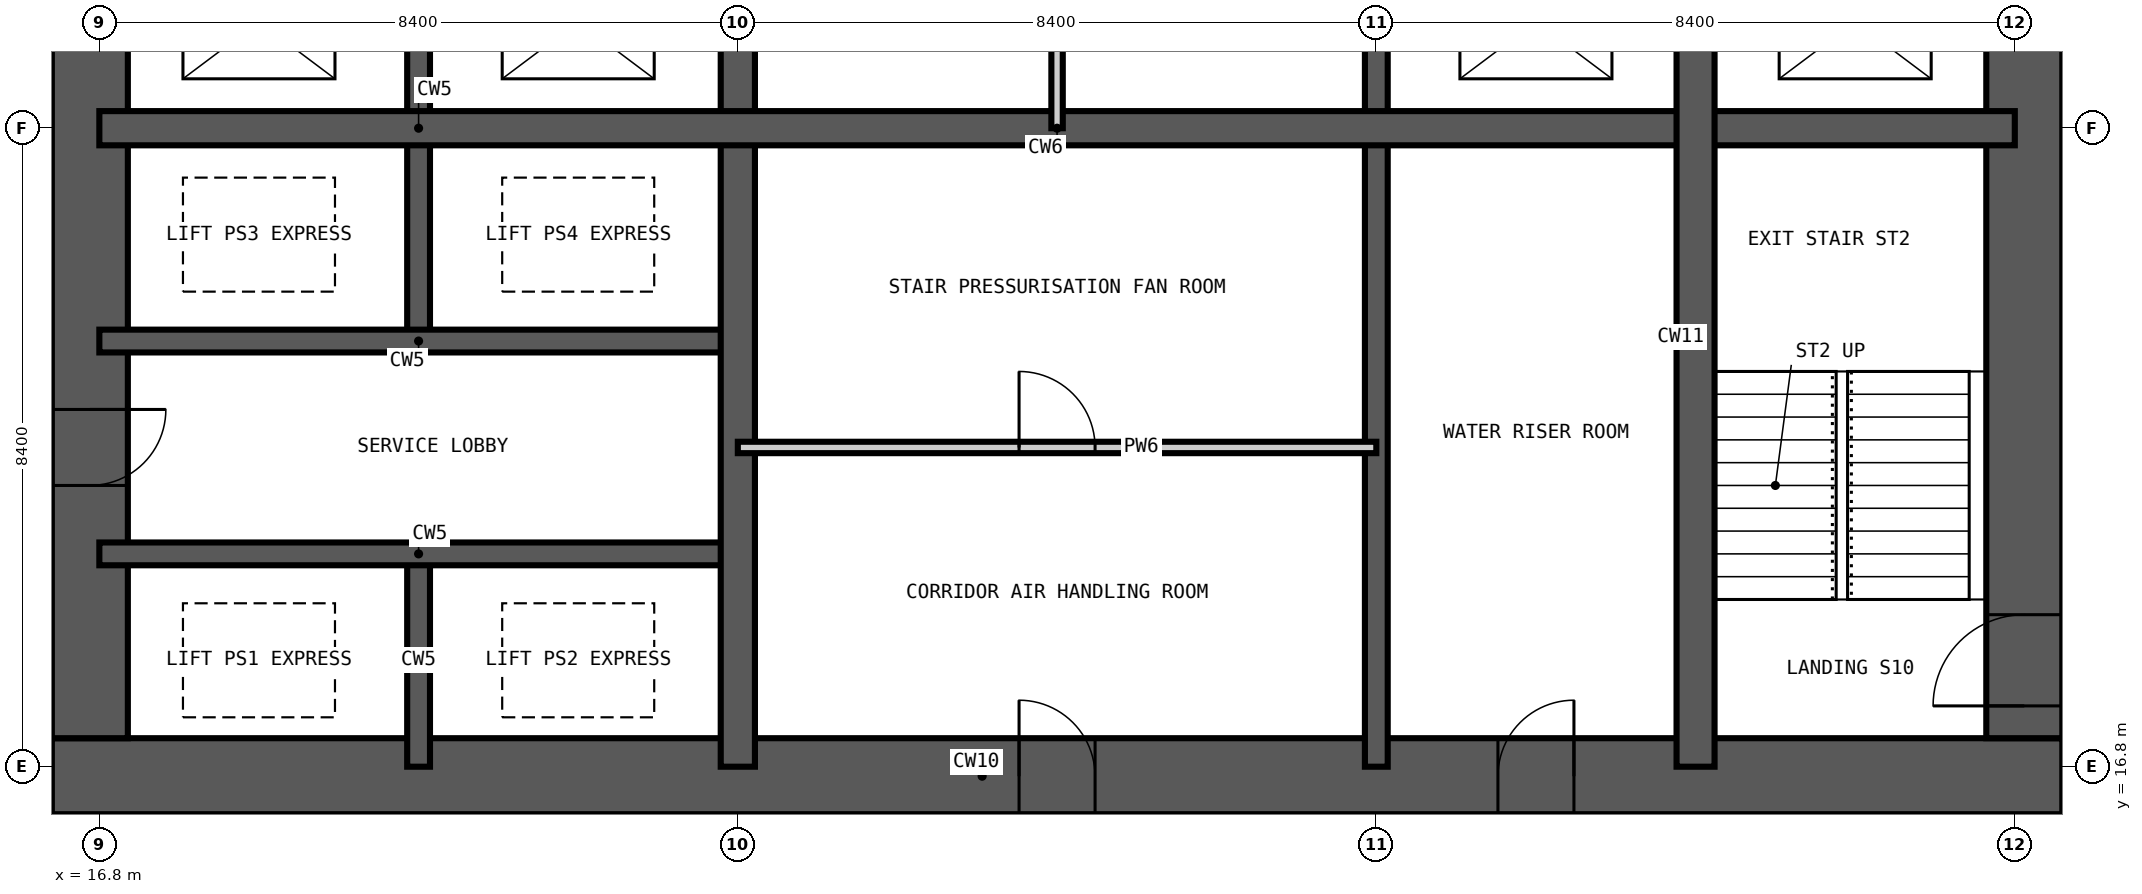
"""IFC4 building model, lengths in metres.
Left out: names, types, materials, properties, quantities, classifications, styles, units other than length and angle.
Written with IfcOpenShell. Run it as: python <this file> out.ifc"""

import sys

from ifc_helpers import new_model, si_unit, direction, frame, frame_2d, origin, place, context, subcontext, project, spatial, rectangle, extrude, element, fill, save


model = new_model("IFC4")
c1 = context("Model", 3, precision=1e-05, world=origin(), true_north=direction((0.0, 1.0)))
c2 = subcontext(c1, "Body", "Model", "MODEL_VIEW")
j1 = project(units=[si_unit("LENGTHUNIT", "METRE"), si_unit("PLANEANGLEUNIT", "RADIAN")], contexts=[c1])
p1 = place(None, origin())
s1 = spatial("IfcSite", under=j1, at=p1, CompositionType="ELEMENT")
p2 = place(p1, origin())
s2 = spatial("IfcBuilding", under=s1, at=p2, CompositionType="ELEMENT")
p3 = place(p2, frame((0.0, 0.0, 122.4)))
s3 = spatial("IfcBuildingStorey", under=s2, at=p3, CompositionType="ELEMENT", Elevation=122.4)
p4 = place(p3, frame((16.175, 16.675, -0.35), z_axis=(0.0, 0.0, 1.0), x_axis=(1.0, 0.0, 0.0)))
e1 = element("IfcWall", 1, at=p4, inside=s3, PredefinedType="SHEAR", context=c2, shape_type="SweptSolid", body=[
    extrude(rectangle(XDim=26.45, YDim=1.0, at=frame_2d((13.225, 0.0))), origin(), (0.0, 0.0, 1.0), 3.6),
])
p5 = place(p4, frame((12.725, 0.0, 0.35)))
e2 = element("IfcOpeningElement", 2, at=p5, cuts=e1, PredefinedType="OPENING", context=c2, shape_type="SweptSolid", body=[
    extrude(rectangle(XDim=1.0, YDim=2.1, at=frame_2d((0.5, 1.05))), frame((0.0, 0.51, 0.0), z_axis=(0.0, -1.0, 0.0), x_axis=(1.0, 0.0, 0.0)), (0.0, 0.0, 1.0), 1.02),
])
p6 = place(p4, frame((19.025, 0.0, 0.35)))
e3 = element("IfcOpeningElement", 3, at=p6, cuts=e1, PredefinedType="OPENING", context=c2, shape_type="SweptSolid", body=[
    extrude(rectangle(XDim=1.0, YDim=2.1, at=frame_2d((0.5, 1.05))), frame((0.0, 0.51, 0.0), z_axis=(0.0, -1.0, 0.0), x_axis=(1.0, 0.0, 0.0)), (0.0, 0.0, 1.0), 1.02),
])
p7 = place(p3, frame((42.125, 17.175, -0.35), z_axis=(0.0, 0.0, 1.0), x_axis=(0.0, 1.0, 0.0)))
e4 = element("IfcWall", 4, at=p7, inside=s3, PredefinedType="SHEAR", context=c2, shape_type="SweptSolid", body=[
    extrude(rectangle(XDim=24.45, YDim=1.0, at=frame_2d((12.225, 0.0))), origin(), (0.0, 0.0, 1.0), 3.6),
])
p8 = place(p7, frame((0.425, 0.0, 0.35)))
e5 = element("IfcOpeningElement", 5, at=p8, cuts=e4, PredefinedType="OPENING", context=c2, shape_type="SweptSolid", body=[
    extrude(rectangle(XDim=1.2, YDim=2.2, at=frame_2d((0.6, 1.1))), frame((0.0, 0.51, 0.0), z_axis=(0.0, -1.0, 0.0), x_axis=(1.0, 0.0, 0.0)), (0.0, 0.0, 1.0), 1.02),
])
p9 = place(p7, frame((11.325, 0.0, 0.35)))
e6 = element("IfcOpeningElement", 6, at=p9, cuts=e4, PredefinedType="OPENING", context=c2, shape_type="SweptSolid", body=[
    extrude(rectangle(XDim=1.8, YDim=2.2, at=frame_2d((0.9, 1.1))), frame((0.0, 0.51, 0.0), z_axis=(0.0, -1.0, 0.0), x_axis=(1.0, 0.0, 0.0)), (0.0, 0.0, 1.0), 1.02),
])
p10 = place(p7, frame((20.125, 0.0, 0.35)))
e7 = element("IfcOpeningElement", 7, at=p10, cuts=e4, PredefinedType="OPENING", context=c2, shape_type="SweptSolid", body=[
    extrude(rectangle(XDim=1.0, YDim=2.1, at=frame_2d((0.5, 1.05))), frame((0.0, 0.51, 0.0), z_axis=(0.0, -1.0, 0.0), x_axis=(1.0, 0.0, 0.0)), (0.0, 0.0, 1.0), 1.02),
])
p11 = place(p3, frame((16.675, 41.625, -0.35), z_axis=(0.0, 0.0, 1.0), x_axis=(0.0, -1.0, 0.0)))
e8 = element("IfcWall", 8, at=p11, inside=s3, PredefinedType="SHEAR", context=c2, shape_type="SweptSolid", body=[
    extrude(rectangle(XDim=24.45, YDim=1.0, at=frame_2d((12.225, 0.0))), origin(), (0.0, 0.0, 1.0), 3.6),
])
p12 = place(p11, frame((11.325, 0.0, 0.35)))
e9 = element("IfcOpeningElement", 9, at=p12, cuts=e8, PredefinedType="OPENING", context=c2, shape_type="SweptSolid", body=[
    extrude(rectangle(XDim=1.8, YDim=2.2, at=frame_2d((0.9, 1.1))), frame((0.0, 0.51, 0.0), z_axis=(0.0, -1.0, 0.0), x_axis=(1.0, 0.0, 0.0)), (0.0, 0.0, 1.0), 1.02),
])
p13 = place(p11, frame((20.125, 0.0, 0.35)))
e10 = element("IfcOpeningElement", 10, at=p13, cuts=e8, PredefinedType="OPENING", context=c2, shape_type="SweptSolid", body=[
    extrude(rectangle(XDim=1.0, YDim=2.1, at=frame_2d((0.5, 1.05))), frame((0.0, 0.51, 0.0), z_axis=(0.0, -1.0, 0.0), x_axis=(1.0, 0.0, 0.0)), (0.0, 0.0, 1.0), 1.02),
])
p14 = place(p11, frame((5.425, 0.0, 0.35)))
e11 = element("IfcOpeningElement", 11, at=p14, cuts=e8, PredefinedType="OPENING", context=c2, shape_type="SweptSolid", body=[
    extrude(rectangle(XDim=1.0, YDim=2.1, at=frame_2d((0.5, 1.05))), frame((0.0, 0.51, 0.0), z_axis=(0.0, -1.0, 0.0), x_axis=(1.0, 0.0, 0.0)), (0.0, 0.0, 1.0), 1.02),
])
p15 = place(p3, frame((21.0, 16.8, -0.35), z_axis=(0.0, 0.0, 1.0), x_axis=(0.0, 1.0, 0.0)))
e12 = element("IfcWall", 12, at=p15, inside=s3, PredefinedType="SHEAR", context=c2, shape_type="SweptSolid", body=[
    extrude(rectangle(XDim=2.8, YDim=0.3, at=frame_2d((1.4, 0.0))), origin(), (0.0, 0.0, 1.0), 3.6),
])
p16 = place(p3, frame((21.0, 22.4, -0.35), z_axis=(0.0, 0.0, 1.0), x_axis=(0.0, 1.0, 0.0)))
e13 = element("IfcWall", 13, at=p16, inside=s3, PredefinedType="SHEAR", context=c2, shape_type="SweptSolid", body=[
    extrude(rectangle(XDim=5.6, YDim=0.3, at=frame_2d((2.8, 0.0))), origin(), (0.0, 0.0, 1.0), 3.6),
])
p17 = place(p3, frame((33.6, 16.8, -0.35), z_axis=(0.0, 0.0, 1.0), x_axis=(0.0, 1.0, 0.0)))
e14 = element("IfcWall", 14, at=p17, inside=s3, PredefinedType="SHEAR", context=c2, shape_type="SweptSolid", body=[
    extrude(rectangle(XDim=25.2, YDim=0.3, at=frame_2d((12.6, 0.0))), origin(), (0.0, 0.0, 1.0), 3.6),
])
p18 = place(p17, frame((22.5, 0.0, 0.35)))
e15 = element("IfcOpeningElement", 15, at=p18, cuts=e14, PredefinedType="OPENING", context=c2, shape_type="SweptSolid", body=[
    extrude(rectangle(XDim=1.2, YDim=2.2, at=frame_2d((0.6, 1.1))), frame((0.0, 0.16, 0.0), z_axis=(0.0, -1.0, 0.0), x_axis=(1.0, 0.0, 0.0)), (0.0, 0.0, 1.0), 0.32),
])
p19 = place(p17, frame((18.3, 0.0, 0.35)))
e16 = element("IfcOpeningElement", 16, at=p19, cuts=e14, PredefinedType="OPENING", context=c2, shape_type="SweptSolid", body=[
    extrude(rectangle(XDim=1.2, YDim=2.2, at=frame_2d((0.6, 1.1))), frame((0.0, 0.16, 0.0), z_axis=(0.0, -1.0, 0.0), x_axis=(1.0, 0.0, 0.0)), (0.0, 0.0, 1.0), 0.32),
])
for number, where, z_axis, x_axis in (
    (17, (16.8, 19.6, -0.35), (0.0, 0.0, 1.0), (1.0, 0.0, 0.0)),
    (18, (16.8, 22.4, -0.35), (0.0, 0.0, 1.0), (1.0, 0.0, 0.0)),
):
    element("IfcWall", number, at=place(p3, frame(where, z_axis=z_axis, x_axis=x_axis)), inside=s3, PredefinedType="SHEAR", context=c2, shape_type="SweptSolid", body=[
        extrude(rectangle(XDim=8.4, YDim=0.3, at=frame_2d((4.2, 0.0))), origin(), (0.0, 0.0, 1.0), 3.6),
    ])
p20 = place(p3, frame((25.2, 16.8, -0.35), z_axis=(0.0, 0.0, 1.0), x_axis=(0.0, 1.0, 0.0)))
e19 = element("IfcWall", 19, at=p20, inside=s3, PredefinedType="SHEAR", context=c2, shape_type="SweptSolid", body=[
    extrude(rectangle(XDim=25.2, YDim=0.45, at=frame_2d((12.6, 0.0))), origin(), (0.0, 0.0, 1.0), 3.6),
])
p21 = place(p20, frame((12.1, 0.0, 0.35)))
e20 = element("IfcOpeningElement", 20, at=p21, cuts=e19, PredefinedType="OPENING", context=c2, shape_type="SweptSolid", body=[
    extrude(rectangle(XDim=1.0, YDim=2.1, at=frame_2d((0.5, 1.05))), frame((0.0, 0.235, 0.0), z_axis=(0.0, -1.0, 0.0), x_axis=(1.0, 0.0, 0.0)), (0.0, 0.0, 1.0), 0.47),
])
p22 = place(p3, frame((16.8, 25.2, -0.35), z_axis=(0.0, 0.0, 1.0), x_axis=(1.0, 0.0, 0.0)))
e21 = element("IfcWall", 21, at=p22, inside=s3, PredefinedType="SHEAR", context=c2, shape_type="SweptSolid", body=[
    extrude(rectangle(XDim=25.2, YDim=0.45, at=frame_2d((12.6, 0.0))), origin(), (0.0, 0.0, 1.0), 3.6),
])
p23 = place(p3, frame((37.8, 16.8, -0.35), z_axis=(0.0, 0.0, 1.0), x_axis=(0.0, 1.0, 0.0)))
e22 = element("IfcWall", 22, at=p23, inside=s3, PredefinedType="SHEAR", context=c2, shape_type="SweptSolid", body=[
    extrude(rectangle(XDim=11.2, YDim=0.5, at=frame_2d((5.6, 0.0))), origin(), (0.0, 0.0, 1.0), 3.6),
])
p24 = place(p3, frame((29.4, 25.2, 0.0), z_axis=(0.0, 0.0, 1.0), x_axis=(0.0, 1.0, 0.0)))
e23 = element("IfcWall", 23, at=p24, inside=s3, PredefinedType="PARTITIONING", context=c2, shape_type="SweptSolid", body=[
    extrude(rectangle(XDim=8.4, YDim=0.15, at=frame_2d((4.2, 0.0))), origin(), (0.0, 0.0, 1.0), 3.25),
])
p25 = place(p24, frame((3.7, 0.0, 0.0)))
e24 = element("IfcOpeningElement", 24, at=p25, cuts=e23, PredefinedType="OPENING", context=c2, shape_type="SweptSolid", body=[
    extrude(rectangle(XDim=1.0, YDim=2.1, at=frame_2d((0.5, 1.05))), frame((0.0, 0.085, 0.0), z_axis=(0.0, -1.0, 0.0), x_axis=(1.0, 0.0, 0.0)), (0.0, 0.0, 1.0), 0.17),
])
p26 = place(p3, frame((25.2, 21.0, 0.0), z_axis=(0.0, 0.0, 1.0), x_axis=(1.0, 0.0, 0.0)))
e25 = element("IfcWall", 25, at=p26, inside=s3, PredefinedType="PARTITIONING", context=c2, shape_type="SweptSolid", body=[
    extrude(rectangle(XDim=8.4, YDim=0.15, at=frame_2d((4.2, 0.0))), origin(), (0.0, 0.0, 1.0), 3.25),
])
p27 = place(p26, frame((3.7, 0.0, 0.0)))
e26 = element("IfcOpeningElement", 26, at=p27, cuts=e25, PredefinedType="OPENING", context=c2, shape_type="SweptSolid", body=[
    extrude(rectangle(XDim=1.0, YDim=2.1, at=frame_2d((0.5, 1.05))), frame((0.0, 0.085, 0.0), z_axis=(0.0, -1.0, 0.0), x_axis=(1.0, 0.0, 0.0)), (0.0, 0.0, 1.0), 0.17),
])
p28 = place(p8, origin())
e27 = element("IfcDoor", 27, at=p28, inside=s3, OperationType="SINGLE_SWING_LEFT", PredefinedType="DOOR", context=c2, shape_type="SweptSolid", body=[
    extrude(rectangle(XDim=1.2, YDim=2.2, at=frame_2d((0.6, 1.1))), frame((0.0, 0.025, 0.0), z_axis=(0.0, -1.0, 0.0), x_axis=(1.0, 0.0, 0.0)), (0.0, 0.0, 1.0), 0.05),
])
fill(e5, e27)
p29 = place(p13, origin())
e28 = element("IfcDoor", 28, at=p29, inside=s3, OperationType="SINGLE_SWING_LEFT", PredefinedType="DOOR", context=c2, shape_type="SweptSolid", body=[
    extrude(rectangle(XDim=1.0, YDim=2.1, at=frame_2d((0.5, 1.05))), frame((0.0, 0.025, 0.0), z_axis=(0.0, -1.0, 0.0), x_axis=(1.0, 0.0, 0.0)), (0.0, 0.0, 1.0), 0.05),
])
fill(e10, e28)
p30 = place(p5, origin())
e29 = element("IfcDoor", 29, at=p30, inside=s3, OperationType="SINGLE_SWING_LEFT", PredefinedType="DOOR", context=c2, shape_type="SweptSolid", body=[
    extrude(rectangle(XDim=1.0, YDim=2.1, at=frame_2d((0.5, 1.05))), frame((0.0, 0.025, 0.0), z_axis=(0.0, -1.0, 0.0), x_axis=(1.0, 0.0, 0.0)), (0.0, 0.0, 1.0), 0.05),
])
fill(e2, e29)
p31 = place(p27, origin())
e30 = element("IfcDoor", 30, at=p31, inside=s3, OperationType="SINGLE_SWING_LEFT", PredefinedType="DOOR", context=c2, shape_type="SweptSolid", body=[
    extrude(rectangle(XDim=1.0, YDim=2.1, at=frame_2d((0.5, 1.05))), frame((0.0, 0.025, 0.0), z_axis=(0.0, -1.0, 0.0), x_axis=(1.0, 0.0, 0.0)), (0.0, 0.0, 1.0), 0.05),
])
fill(e26, e30)
p32 = place(p6, origin())
e31 = element("IfcDoor", 31, at=p32, inside=s3, OperationType="SINGLE_SWING_RIGHT", PredefinedType="DOOR", context=c2, shape_type="SweptSolid", body=[
    extrude(rectangle(XDim=1.0, YDim=2.1, at=frame_2d((0.5, 1.05))), frame((0.0, 0.025, 0.0), z_axis=(0.0, -1.0, 0.0), x_axis=(1.0, 0.0, 0.0)), (0.0, 0.0, 1.0), 0.05),
])
fill(e3, e31)
save(model, sys.argv[1])
